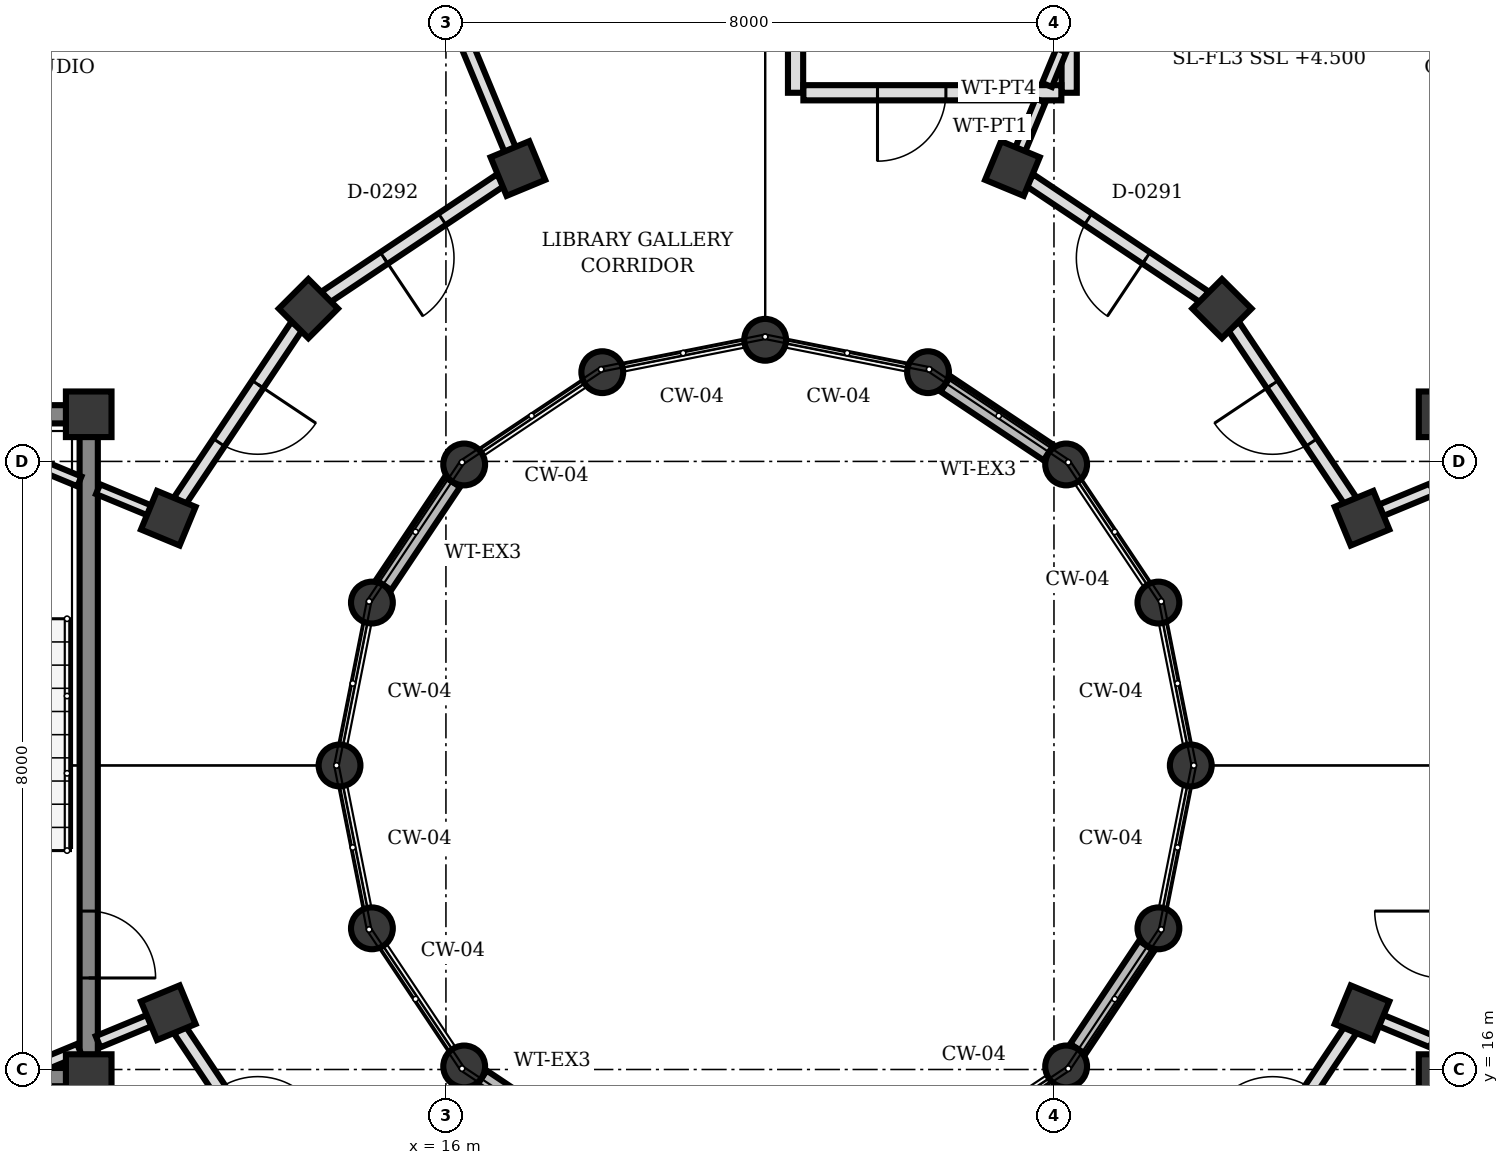
"""IFC4 building model, lengths in metres.
Left out: names, types, materials, properties, quantities, classifications, styles, units other than length and angle.
Written with IfcOpenShell. Run it as: python <this file> out.ifc"""

import sys

from ifc_helpers import new_model, si_unit, direction, frame, frame_2d, origin, origin_2d, place, context, subcontext, project, spatial, rectangle, circle, extrude, element, fill, save


model = new_model("IFC4")
c1 = context("Model", 3, precision=1e-05, world=origin(), true_north=direction((0.0, 1.0)))
c2 = subcontext(c1, "Body", "Model", "MODEL_VIEW")
j1 = project(units=[si_unit("LENGTHUNIT", "METRE"), si_unit("PLANEANGLEUNIT", "RADIAN")], contexts=[c1])
p1 = place(None, origin())
s1 = spatial("IfcSite", under=j1, at=p1, CompositionType="ELEMENT")
p2 = place(p1, origin())
s2 = spatial("IfcBuilding", under=s1, at=p2, CompositionType="ELEMENT")
p3 = place(p2, frame((0.0, 0.0, 4.5)))
s3 = spatial("IfcBuildingStorey", under=s2, at=p3, CompositionType="ELEMENT", Elevation=4.5)
for number, where, z_axis, x_axis in (
    (1, (11.3, 15.9, 0.0), (0.0, 0.0, 1.0), (1.0, 0.0, 0.0)),
    (2, (11.3, 24.62, 0.0), (0.0, 0.0, 1.0), (1.0, 0.0, 0.0)),
    (3, (29.1, 15.9, 0.0), (0.0, 0.0, 1.0), (1.0, 0.0, 0.0)),
    (4, (29.1, 24.62, 0.0), (0.0, 0.0, 1.0), (1.0, 0.0, 0.0)),
):
    element("IfcColumn", number, at=place(p3, frame(where, z_axis=z_axis, x_axis=x_axis)), inside=s3, PredefinedType="COLUMN", context=c2, shape_type="SweptSolid", body=[
        extrude(rectangle(XDim=0.6, YDim=0.6, at=origin_2d()), origin(), (0.0, 0.0, 1.0), 4.0),
    ])
for number, where, z_axis, x_axis in (
    (5, (25.8, 20.0, 0.0), (0.0, 0.0, 1.0), (1.0, 0.0, 0.0)),
    (6, (25.374, 22.143, 0.0), (0.0, 0.0, 1.0), (1.0, 0.0, 0.0)),
    (7, (24.16, 23.96, 0.0), (0.0, 0.0, 1.0), (1.0, 0.0, 0.0)),
    (8, (22.343, 25.174, 0.0), (0.0, 0.0, 1.0), (1.0, 0.0, 0.0)),
    (9, (20.2, 25.6, 0.0), (0.0, 0.0, 1.0), (1.0, 0.0, 0.0)),
    (10, (18.057, 25.174, 0.0), (0.0, 0.0, 1.0), (1.0, 0.0, 0.0)),
    (11, (16.24, 23.96, 0.0), (0.0, 0.0, 1.0), (1.0, 0.0, 0.0)),
    (12, (15.026, 22.143, 0.0), (0.0, 0.0, 1.0), (1.0, 0.0, 0.0)),
    (13, (14.6, 20.0, 0.0), (0.0, 0.0, 1.0), (1.0, 0.0, 0.0)),
    (14, (15.026, 17.857, 0.0), (0.0, 0.0, 1.0), (1.0, 0.0, 0.0)),
    (15, (16.24, 16.04, 0.0), (0.0, 0.0, 1.0), (1.0, 0.0, 0.0)),
    (16, (24.16, 16.04, 0.0), (0.0, 0.0, 1.0), (1.0, 0.0, 0.0)),
    (17, (25.374, 17.857, 0.0), (0.0, 0.0, 1.0), (1.0, 0.0, 0.0)),
):
    element("IfcColumn", number, at=place(p3, frame(where, z_axis=z_axis, x_axis=x_axis)), inside=s3, PredefinedType="COLUMN", context=c2, shape_type="SweptSolid", body=[
        extrude(circle(Radius=0.275, at=origin_2d()), origin(), (0.0, 0.0, 1.0), 4.0),
    ])
for number, where, z_axis, x_axis in (
    (18, (28.053, 23.253, 0.0), (0.0, 0.0, 1.0), (0.924, 0.383, 0.0)),
    (19, (26.21, 26.01, 0.0), (0.0, 0.0, 1.0), (0.707, 0.707, 0.0)),
    (20, (23.453, 27.853, 0.0), (0.0, 0.0, 1.0), (0.383, 0.924, 0.0)),
    (21, (16.947, 27.853, 0.0), (0.0, 0.0, 1.0), (-0.383, 0.924, 0.0)),
    (22, (14.19, 26.01, 0.0), (0.0, 0.0, 1.0), (-0.707, 0.707, 0.0)),
    (23, (12.347, 23.253, 0.0), (0.0, 0.0, 1.0), (-0.924, 0.383, 0.0)),
    (24, (12.347, 16.747, 0.0), (0.0, 0.0, 1.0), (-0.924, -0.383, 0.0)),
    (25, (28.053, 16.747, 0.0), (0.0, 0.0, 1.0), (0.924, -0.383, 0.0)),
):
    element("IfcColumn", number, at=place(p3, frame(where, z_axis=z_axis, x_axis=x_axis)), inside=s3, PredefinedType="COLUMN", context=c2, shape_type="SweptSolid", body=[
        extrude(rectangle(XDim=0.55, YDim=0.55, at=origin_2d()), origin(), (0.0, 0.0, 1.0), 4.0),
    ])
for number, where, z_axis, x_axis in (
    (26, (23.93, 24.114, 0.0), (0.0, 0.0, 1.0), (-0.832, 0.555, 0.0)),
    (27, (16.086, 23.73, 0.0), (0.0, 0.0, 1.0), (-0.555, -0.832, 0.0)),
    (28, (16.47, 15.886, 0.0), (0.0, 0.0, 1.0), (0.832, -0.555, 0.0)),
    (29, (24.314, 16.27, 0.0), (0.0, 0.0, 1.0), (0.555, 0.832, 0.0)),
):
    element("IfcWall", number, at=place(p3, frame(where, z_axis=z_axis, x_axis=x_axis)), inside=s3, PredefinedType="SOLIDWALL", context=c2, shape_type="SweptSolid", body=[
        extrude(rectangle(XDim=1.632, YDim=0.24, at=frame_2d((0.816, 0.0))), origin(), (0.0, 0.0, 1.0), 3.222),
    ])
p4 = place(p3, frame((11.3, 24.328, 0.0), z_axis=(0.0, 0.0, 1.0), x_axis=(0.0, -1.0, 0.0)))
e30 = element("IfcWall", 30, at=p4, inside=s3, PredefinedType="SHEAR", context=c2, shape_type="SweptSolid", body=[
    extrude(rectangle(XDim=8.136, YDim=0.24, at=frame_2d((4.068, 0.0))), origin(), (0.0, 0.0, 1.0), 3.74),
])
p5 = place(p4, frame((6.244, 0.0, 0.0)))
e31 = element("IfcOpeningElement", 31, at=p5, cuts=e30, PredefinedType="OPENING", context=c2, shape_type="SweptSolid", body=[
    extrude(rectangle(XDim=0.88, YDim=2.1, at=frame_2d((0.44, 1.05))), frame((0.0, 0.13, 0.0), z_axis=(0.0, -1.0, 0.0), x_axis=(1.0, 0.0, 0.0)), (0.0, 0.0, 1.0), 0.26),
])
for number, where, z_axis, x_axis in (
    (32, (11.008, 15.9, 0.0), (0.0, 0.0, 1.0), (-1.0, 0.0, 0.0)),
    (33, (11.008, 24.62, 0.0), (0.0, 0.0, 1.0), (-1.0, 0.0, 0.0)),
):
    element("IfcWall", number, at=place(p3, frame(where, z_axis=z_axis, x_axis=x_axis)), inside=s3, PredefinedType="SHEAR", context=c2, shape_type="SweptSolid", body=[
        extrude(rectangle(XDim=4.216, YDim=0.24, at=frame_2d((2.108, 0.0))), origin(), (0.0, 0.0, 1.0), 3.74),
    ])
p6 = place(p3, frame((20.6, 28.85, 0.0), z_axis=(0.0, 0.0, 1.0), x_axis=(0.0, 1.0, 0.0)))
e34 = element("IfcWall", 34, at=p6, inside=s3, PredefinedType="PARTITIONING", context=c2, shape_type="SweptSolid", body=[
    extrude(rectangle(XDim=3.283, YDim=0.2, at=frame_2d((1.642, 0.0))), origin(), (0.0, 0.0, 1.0), 3.7),
])
p7 = place(p3, frame((24.2, 28.85, 0.0), z_axis=(0.0, 0.0, 1.0), x_axis=(0.0, 1.0, 0.0)))
e35 = element("IfcWall", 35, at=p7, inside=s3, PredefinedType="PARTITIONING", context=c2, shape_type="SweptSolid", body=[
    extrude(rectangle(XDim=3.447, YDim=0.2, at=frame_2d((1.724, 0.0))), origin(), (0.0, 0.0, 1.0), 3.072),
])
p8 = place(p3, frame((24.097, 28.85, 0.0), z_axis=(0.0, 0.0, 1.0), x_axis=(-1.0, 0.0, 0.0)))
e36 = element("IfcWall", 36, at=p8, inside=s3, PredefinedType="PARTITIONING", context=c2, shape_type="SweptSolid", body=[
    extrude(rectangle(XDim=3.394, YDim=0.2, at=frame_2d((1.697, 0.0))), origin(), (0.0, 0.0, 1.0), 3.072),
])
p9 = place(p8, frame((1.519, 0.0, 0.0)))
e37 = element("IfcOpeningElement", 37, at=p9, cuts=e36, PredefinedType="OPENING", context=c2, shape_type="SweptSolid", body=[
    extrude(rectangle(XDim=0.9, YDim=2.2, at=frame_2d((0.45, 1.1))), frame((0.0, 0.11, 0.0), z_axis=(0.0, -1.0, 0.0), x_axis=(1.0, 0.0, 0.0)), (0.0, 0.0, 1.0), 0.22),
])
p10 = place(p3, frame((28.3, 23.355, 0.0), z_axis=(0.0, 0.0, 1.0), x_axis=(0.924069600435, 0.382224245113, 0.0)))
e38 = element("IfcWall", 38, at=p10, inside=s3, PredefinedType="PARTITIONING", context=c2, shape_type="SweptSolid", body=[
    extrude(rectangle(XDim=0.733, YDim=0.16, at=frame_2d((0.366, 0.0))), origin(), (0.0, 0.0, 1.0), 3.7),
])
p11 = place(p3, frame((23.555, 28.1, 0.0), z_axis=(0.0, 0.0, 1.0), x_axis=(0.38278283439, 0.923838352579, 0.0)))
e39 = element("IfcWall", 39, at=p11, inside=s3, PredefinedType="PARTITIONING", context=c2, shape_type="SweptSolid", body=[
    extrude(rectangle(XDim=0.7, YDim=0.14, at=frame_2d((0.35, 0.0))), origin(), (0.0, 0.0, 1.0), 3.072),
])
p12 = place(p3, frame((23.908, 28.953, 0.0), z_axis=(0.0, 0.0, 1.0), x_axis=(0.3827885685, 0.92383597669, 0.0)))
e40 = element("IfcWall", 40, at=p12, inside=s3, PredefinedType="PARTITIONING", context=c2, shape_type="SweptSolid", body=[
    extrude(rectangle(XDim=0.494, YDim=0.14, at=frame_2d((0.247, 0.0))), origin(), (0.0, 0.0, 1.0), 3.072),
])
p13 = place(p3, frame((16.845, 28.1, 0.0), z_axis=(0.0, 0.0, 1.0), x_axis=(-0.382683896966, 0.923879340067, 0.0)))
e41 = element("IfcWall", 41, at=p13, inside=s3, PredefinedType="PARTITIONING", context=c2, shape_type="SweptSolid", body=[
    extrude(rectangle(XDim=8.44, YDim=0.16, at=frame_2d((4.22, 0.0))), origin(), (0.0, 0.0, 1.0), 3.072),
])
p14 = place(p3, frame((12.1, 23.355, 0.0), z_axis=(0.0, 0.0, 1.0), x_axis=(-0.924069600435, 0.382224245113, 0.0)))
e42 = element("IfcWall", 42, at=p14, inside=s3, PredefinedType="PARTITIONING", context=c2, shape_type="SweptSolid", body=[
    extrude(rectangle(XDim=0.733, YDim=0.14, at=frame_2d((0.366, 0.0))), origin(), (0.0, 0.0, 1.0), 3.7),
])
p15 = place(p3, frame((11.177, 23.737, 0.0), z_axis=(0.0, 0.0, 1.0), x_axis=(-0.923817443679, 0.382833293686, 0.0)))
e43 = element("IfcWall", 43, at=p15, inside=s3, PredefinedType="PARTITIONING", context=c2, shape_type="SweptSolid", body=[
    extrude(rectangle(XDim=1.985, YDim=0.14, at=frame_2d((0.993, 0.0))), origin(), (0.0, 0.0, 1.0), 3.7),
])
p16 = place(p3, frame((12.1, 16.645, 0.0), z_axis=(0.0, 0.0, 1.0), x_axis=(-0.924069600435, -0.382224245113, 0.0)))
e44 = element("IfcWall", 44, at=p16, inside=s3, PredefinedType="PARTITIONING", context=c2, shape_type="SweptSolid", body=[
    extrude(rectangle(XDim=0.733, YDim=0.16, at=frame_2d((0.366, 0.0))), origin(), (0.0, 0.0, 1.0), 3.072),
])
p17 = place(p3, frame((11.177, 16.263, 0.0), z_axis=(0.0, 0.0, 1.0), x_axis=(-0.923812676193, -0.382844797933, 0.0)))
e45 = element("IfcWall", 45, at=p17, inside=s3, PredefinedType="PARTITIONING", context=c2, shape_type="SweptSolid", body=[
    extrude(rectangle(XDim=0.627, YDim=0.16, at=frame_2d((0.313, 0.0))), origin(), (0.0, 0.0, 1.0), 3.072),
])
p18 = place(p3, frame((28.3, 16.645, 0.0), z_axis=(0.0, 0.0, 1.0), x_axis=(0.924069600435, -0.382224245113, 0.0)))
e46 = element("IfcWall", 46, at=p18, inside=s3, PredefinedType="PARTITIONING", context=c2, shape_type="SweptSolid", body=[
    extrude(rectangle(XDim=0.733, YDim=0.16, at=frame_2d((0.366, 0.0))), origin(), (0.0, 0.0, 1.0), 3.072),
])
p19 = place(p3, frame((27.902, 23.479, 0.0), z_axis=(0.0, 0.0, 1.0), x_axis=(-0.555797002478, 0.831318045056, 0.0)))
e47 = element("IfcWall", 47, at=p19, inside=s3, PredefinedType="PARTITIONING", context=c2, shape_type="SweptSolid", body=[
    extrude(rectangle(XDim=2.773, YDim=0.18, at=frame_2d((1.386, 0.0))), origin(), (0.0, 0.0, 1.0), 3.072),
])
p20 = place(p19, frame((0.926, 0.0, 0.0)))
e48 = element("IfcOpeningElement", 48, at=p20, cuts=e47, PredefinedType="OPENING", context=c2, shape_type="SweptSolid", body=[
    extrude(rectangle(XDim=0.92, YDim=2.1, at=frame_2d((0.46, 1.05))), frame((0.0, 0.1, 0.0), z_axis=(0.0, -1.0, 0.0), x_axis=(1.0, 0.0, 0.0)), (0.0, 0.0, 1.0), 0.2),
])
p21 = place(p3, frame((25.984, 26.161, 0.0), z_axis=(0.0, 0.0, 1.0), x_axis=(-0.831318045056, 0.555797002478, 0.0)))
e49 = element("IfcWall", 49, at=p21, inside=s3, PredefinedType="PARTITIONING", context=c2, shape_type="SweptSolid", body=[
    extrude(rectangle(XDim=2.773, YDim=0.18, at=frame_2d((1.386, 0.0))), origin(), (0.0, 0.0, 1.0), 3.072),
])
p22 = place(p21, frame((0.926, 0.0, 0.0)))
e50 = element("IfcOpeningElement", 50, at=p22, cuts=e49, PredefinedType="OPENING", context=c2, shape_type="SweptSolid", body=[
    extrude(rectangle(XDim=0.92, YDim=2.1, at=frame_2d((0.46, 1.05))), frame((0.0, 0.1, 0.0), z_axis=(0.0, -1.0, 0.0), x_axis=(1.0, 0.0, 0.0)), (0.0, 0.0, 1.0), 0.2),
])
p23 = place(p3, frame((16.721, 27.702, 0.0), z_axis=(0.0, 0.0, 1.0), x_axis=(-0.831318045056, -0.555797002478, 0.0)))
e51 = element("IfcWall", 51, at=p23, inside=s3, PredefinedType="PARTITIONING", context=c2, shape_type="SweptSolid", body=[
    extrude(rectangle(XDim=2.773, YDim=0.18, at=frame_2d((1.386, 0.0))), origin(), (0.0, 0.0, 1.0), 3.072),
])
p24 = place(p23, frame((0.926, 0.0, 0.0)))
e52 = element("IfcOpeningElement", 52, at=p24, cuts=e51, PredefinedType="OPENING", context=c2, shape_type="SweptSolid", body=[
    extrude(rectangle(XDim=0.92, YDim=2.1, at=frame_2d((0.46, 1.05))), frame((0.0, 0.1, 0.0), z_axis=(0.0, -1.0, 0.0), x_axis=(1.0, 0.0, 0.0)), (0.0, 0.0, 1.0), 0.2),
])
p25 = place(p3, frame((14.039, 25.784, 0.0), z_axis=(0.0, 0.0, 1.0), x_axis=(-0.555797002478, -0.831318045056, 0.0)))
e53 = element("IfcWall", 53, at=p25, inside=s3, PredefinedType="PARTITIONING", context=c2, shape_type="SweptSolid", body=[
    extrude(rectangle(XDim=2.773, YDim=0.18, at=frame_2d((1.386, 0.0))), origin(), (0.0, 0.0, 1.0), 3.072),
])
p26 = place(p25, frame((0.926, 0.0, 0.0)))
e54 = element("IfcOpeningElement", 54, at=p26, cuts=e53, PredefinedType="OPENING", context=c2, shape_type="SweptSolid", body=[
    extrude(rectangle(XDim=0.92, YDim=2.1, at=frame_2d((0.46, 1.05))), frame((0.0, 0.1, 0.0), z_axis=(0.0, -1.0, 0.0), x_axis=(1.0, 0.0, 0.0)), (0.0, 0.0, 1.0), 0.2),
])
p27 = place(p3, frame((12.498, 16.521, 0.0), z_axis=(0.0, 0.0, 1.0), x_axis=(0.555797002478, -0.831318045056, 0.0)))
e55 = element("IfcWall", 55, at=p27, inside=s3, PredefinedType="PARTITIONING", context=c2, shape_type="SweptSolid", body=[
    extrude(rectangle(XDim=2.773, YDim=0.18, at=frame_2d((1.386, 0.0))), origin(), (0.0, 0.0, 1.0), 3.072),
])
p28 = place(p27, frame((0.926, 0.0, 0.0)))
e56 = element("IfcOpeningElement", 56, at=p28, cuts=e55, PredefinedType="OPENING", context=c2, shape_type="SweptSolid", body=[
    extrude(rectangle(XDim=0.92, YDim=2.1, at=frame_2d((0.46, 1.05))), frame((0.0, 0.1, 0.0), z_axis=(0.0, -1.0, 0.0), x_axis=(1.0, 0.0, 0.0)), (0.0, 0.0, 1.0), 0.2),
])
p29 = place(p3, frame((26.361, 14.216, 0.0), z_axis=(0.0, 0.0, 1.0), x_axis=(0.555797002478, 0.831318045056, 0.0)))
e57 = element("IfcWall", 57, at=p29, inside=s3, PredefinedType="PARTITIONING", context=c2, shape_type="SweptSolid", body=[
    extrude(rectangle(XDim=2.773, YDim=0.18, at=frame_2d((1.386, 0.0))), origin(), (0.0, 0.0, 1.0), 3.072),
])
p30 = place(p29, frame((0.926, 0.0, 0.0)))
e58 = element("IfcOpeningElement", 58, at=p30, cuts=e57, PredefinedType="OPENING", context=c2, shape_type="SweptSolid", body=[
    extrude(rectangle(XDim=0.92, YDim=2.1, at=frame_2d((0.46, 1.05))), frame((0.0, 0.1, 0.0), z_axis=(0.0, -1.0, 0.0), x_axis=(1.0, 0.0, 0.0)), (0.0, 0.0, 1.0), 0.2),
])
p31 = place(p5, origin())
e59 = element("IfcDoor", 59, at=p31, inside=s3, OperationType="SINGLE_SWING_RIGHT", PredefinedType="DOOR", context=c2, shape_type="SweptSolid", body=[
    extrude(rectangle(XDim=0.88, YDim=2.1, at=frame_2d((0.44, 1.05))), frame((0.0, 0.025, 0.0), z_axis=(0.0, -1.0, 0.0), x_axis=(1.0, 0.0, 0.0)), (0.0, 0.0, 1.0), 0.05),
])
fill(e31, e59)
p32 = place(p9, origin())
e60 = element("IfcDoor", 60, at=p32, inside=s3, OperationType="SINGLE_SWING_RIGHT", PredefinedType="DOOR", context=c2, shape_type="SweptSolid", body=[
    extrude(rectangle(XDim=0.9, YDim=2.2, at=frame_2d((0.45, 1.1))), frame((0.0, 0.025, 0.0), z_axis=(0.0, -1.0, 0.0), x_axis=(1.0, 0.0, 0.0)), (0.0, 0.0, 1.0), 0.05),
])
fill(e37, e60)
p33 = place(p20, origin())
e61 = element("IfcDoor", 61, at=p33, inside=s3, OperationType="SINGLE_SWING_RIGHT", PredefinedType="DOOR", context=c2, shape_type="SweptSolid", body=[
    extrude(rectangle(XDim=0.92, YDim=2.1, at=frame_2d((0.46, 1.05))), frame((0.0, 0.025, 0.0), z_axis=(0.0, -1.0, 0.0), x_axis=(1.0, 0.0, 0.0)), (0.0, 0.0, 1.0), 0.05),
])
fill(e48, e61)
p34 = place(p22, origin())
e62 = element("IfcDoor", 62, at=p34, inside=s3, OperationType="SINGLE_SWING_LEFT", PredefinedType="DOOR", context=c2, shape_type="SweptSolid", body=[
    extrude(rectangle(XDim=0.92, YDim=2.1, at=frame_2d((0.46, 1.05))), frame((0.0, 0.025, 0.0), z_axis=(0.0, -1.0, 0.0), x_axis=(1.0, 0.0, 0.0)), (0.0, 0.0, 1.0), 0.05),
])
fill(e50, e62)
p35 = place(p24, origin())
e63 = element("IfcDoor", 63, at=p35, inside=s3, OperationType="SINGLE_SWING_RIGHT", PredefinedType="DOOR", context=c2, shape_type="SweptSolid", body=[
    extrude(rectangle(XDim=0.92, YDim=2.1, at=frame_2d((0.46, 1.05))), frame((0.0, 0.025, 0.0), z_axis=(0.0, -1.0, 0.0), x_axis=(1.0, 0.0, 0.0)), (0.0, 0.0, 1.0), 0.05),
])
fill(e52, e63)
p36 = place(p26, origin())
e64 = element("IfcDoor", 64, at=p36, inside=s3, OperationType="SINGLE_SWING_LEFT", PredefinedType="DOOR", context=c2, shape_type="SweptSolid", body=[
    extrude(rectangle(XDim=0.92, YDim=2.1, at=frame_2d((0.46, 1.05))), frame((0.0, 0.025, 0.0), z_axis=(0.0, -1.0, 0.0), x_axis=(1.0, 0.0, 0.0)), (0.0, 0.0, 1.0), 0.05),
])
fill(e54, e64)
save(model, sys.argv[1])
